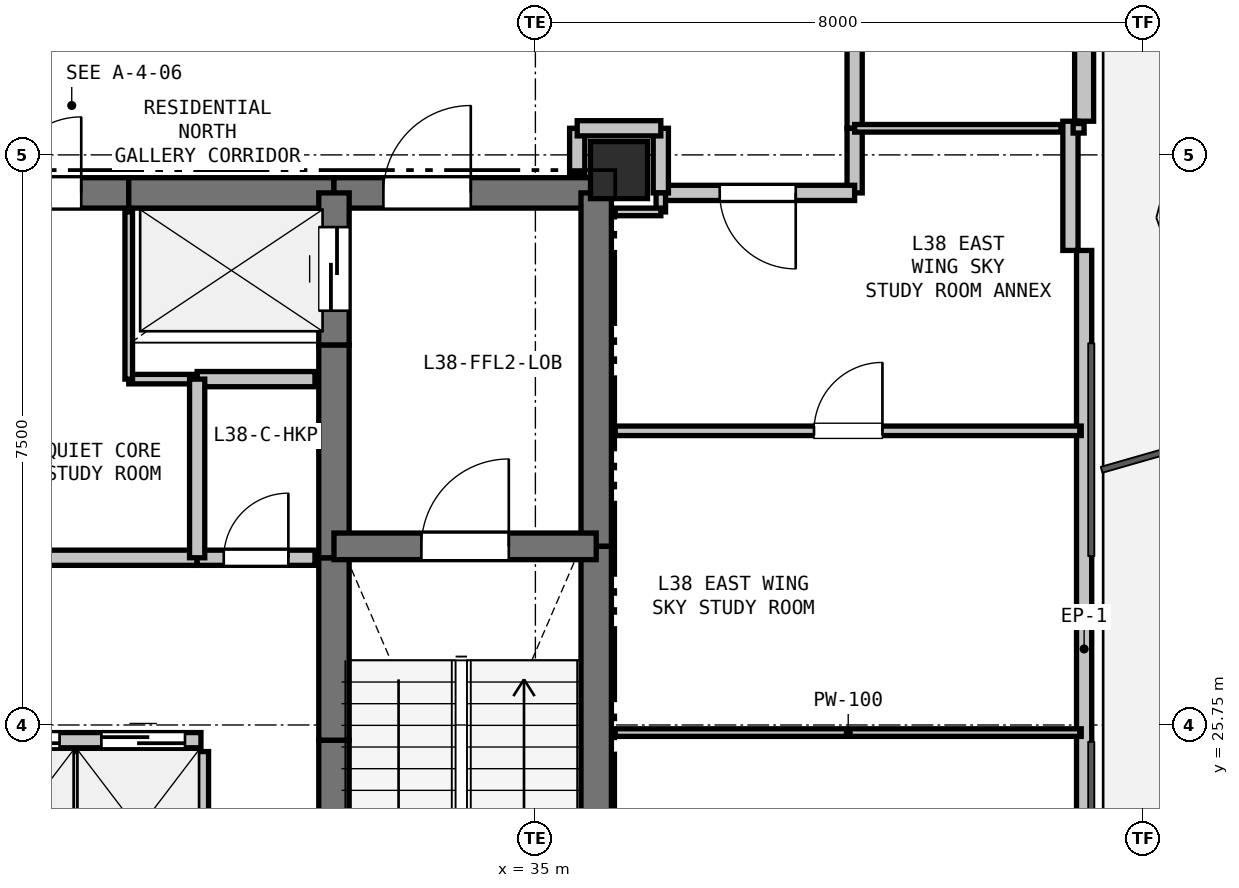
"""IFC4 building model, lengths in metres.
Left out: names, types, materials, properties, quantities, classifications, styles, units other than length and angle.
Written with IfcOpenShell. Run it as: python <this file> out.ifc"""

import sys

from ifc_helpers import new_model, si_unit, direction, frame, frame_2d, origin, origin_2d, place, context, subcontext, project, spatial, rectangle, extrude, element, fill, save


model = new_model("IFC4")
c1 = context("Model", 3, precision=1e-05, world=origin(), true_north=direction((0.0, 1.0)))
c2 = subcontext(c1, "Body", "Model", "MODEL_VIEW")
j1 = project(units=[si_unit("LENGTHUNIT", "METRE"), si_unit("PLANEANGLEUNIT", "RADIAN")], contexts=[c1])
p1 = place(None, origin())
s1 = spatial("IfcSite", under=j1, at=p1, CompositionType="ELEMENT")
p2 = place(p1, origin())
s2 = spatial("IfcBuilding", under=s1, at=p2, CompositionType="ELEMENT")
p3 = place(p2, frame((0.0, 0.0, 137.7)))
s3 = spatial("IfcBuildingStorey", under=s2, at=p3, CompositionType="ELEMENT", Elevation=137.7)
p4 = place(p3, frame((36.1, 33.05, 0.0), z_axis=(0.0, 0.0, 1.0), x_axis=(1.0, 0.0, 0.0)))
e1 = element("IfcColumn", 1, at=p4, inside=s3, PredefinedType="COLUMN", context=c2, shape_type="SweptSolid", body=[
    extrude(rectangle(XDim=0.75, YDim=0.75, at=origin_2d()), origin(), (0.0, 0.0, 1.0), 3.3),
])
p5 = place(p3, frame((42.219, 44.879, 0.0), z_axis=(0.0, 0.0, 1.0), x_axis=(0.0, -1.0, 0.0)))
e2 = element("IfcWall", 2, at=p5, inside=s3, PredefinedType="SOLIDWALL", context=c2, shape_type="SweptSolid", body=[
    extrude(rectangle(XDim=11.186, YDim=0.25, at=frame_2d((5.593, 0.0))), origin(), (0.0, 0.0, 1.0), 2.68),
])
p6 = place(p5, frame((8.109, 0.0, 0.0)))
e3 = element("IfcOpeningElement", 3, at=p6, cuts=e2, PredefinedType="OPENING", context=c2, shape_type="SweptSolid", body=[
    extrude(rectangle(XDim=1.1, YDim=2.1, at=frame_2d((0.55, 1.05))), frame((0.0, 0.135, 0.0), z_axis=(0.0, -1.0, 0.0), x_axis=(1.0, 0.0, 0.0)), (0.0, 0.0, 1.0), 0.27),
])
p7 = place(p5, frame((3.886, 0.0, 0.9)))
e4 = element("IfcOpeningElement", 4, at=p7, cuts=e2, PredefinedType="OPENING", context=c2, shape_type="SweptSolid", body=[
    extrude(rectangle(XDim=1.2, YDim=1.4, at=frame_2d((0.6, 0.7))), frame((0.0, 0.135, 0.0), z_axis=(0.0, -1.0, 0.0), x_axis=(1.0, 0.0, 0.0)), (0.0, 0.0, 1.0), 0.27),
])
p8 = place(p3, frame((42.219, 31.993, 0.0), z_axis=(0.0, 0.0, 1.0), x_axis=(0.0, -1.0, 0.0)))
e5 = element("IfcWall", 5, at=p8, inside=s3, PredefinedType="PARAPET", context=c2, shape_type="SweptSolid", body=[
    extrude(rectangle(XDim=10.486, YDim=0.2, at=frame_2d((5.243, 0.0))), origin(), (0.0, 0.0, 1.0), 0.2),
])
p9 = place(p3, frame((42.039, 33.693, 0.0), z_axis=(0.0, 0.0, 1.0), x_axis=(0.0, -1.0, 0.0)))
e6 = element("IfcWall", 6, at=p9, inside=s3, PredefinedType="PARAPET", context=c2, shape_type="SweptSolid", body=[
    extrude(rectangle(XDim=1.7, YDim=0.2, at=frame_2d((0.85, 0.0))), origin(), (0.0, 0.0, 1.0), 2.68),
])
p10 = place(p3, frame((27.4, 32.75, 0.0), z_axis=(0.0, 0.0, 1.0), x_axis=(1.0, 0.0, 0.0)))
e7 = element("IfcWall", 7, at=p10, inside=s3, PredefinedType="SHEAR", context=c2, shape_type="SweptSolid", body=[
    extrude(rectangle(XDim=2.25, YDim=0.4, at=frame_2d((1.125, 0.0))), origin(), (0.0, 0.0, 1.0), 3.06),
])
p11 = place(p10, frame((0.625, 0.0, 0.0)))
e8 = element("IfcOpeningElement", 8, at=p11, cuts=e7, PredefinedType="OPENING", context=c2, shape_type="SweptSolid", body=[
    extrude(rectangle(XDim=1.0, YDim=2.15, at=frame_2d((0.5, 1.075))), frame((0.0, 0.21, 0.0), z_axis=(0.0, -1.0, 0.0), x_axis=(1.0, 0.0, 0.0)), (0.0, 0.0, 1.0), 0.42),
])
p12 = place(p3, frame((29.65, 32.75, 0.0), z_axis=(0.0, 0.0, 1.0), x_axis=(1.0, 0.0, 0.0)))
e9 = element("IfcWall", 9, at=p12, inside=s3, PredefinedType="SHEAR", context=c2, shape_type="SweptSolid", body=[
    extrude(rectangle(XDim=2.7, YDim=0.4, at=frame_2d((1.35, 0.0))), origin(), (0.0, 0.0, 1.0), 3.06),
])
p13 = place(p3, frame((32.35, 32.75, 0.0), z_axis=(0.0, 0.0, 1.0), x_axis=(1.0, 0.0, 0.0)))
e10 = element("IfcWall", 10, at=p13, inside=s3, PredefinedType="SHEAR", context=c2, shape_type="SweptSolid", body=[
    extrude(rectangle(XDim=3.45, YDim=0.4, at=frame_2d((1.725, 0.0))), origin(), (0.0, 0.0, 1.0), 3.06),
])
p14 = place(p13, frame((0.65, 0.0, 0.0)))
e11 = element("IfcOpeningElement", 11, at=p14, cuts=e10, PredefinedType="OPENING", context=c2, shape_type="SweptSolid", body=[
    extrude(rectangle(XDim=1.15, YDim=2.15, at=frame_2d((0.575, 1.075))), frame((0.0, 0.21, 0.0), z_axis=(0.0, -1.0, 0.0), x_axis=(1.0, 0.0, 0.0)), (0.0, 0.0, 1.0), 0.42),
])
p15 = place(p3, frame((35.8, 32.75, 0.0), z_axis=(0.0, 0.0, 1.0), x_axis=(0.0, -1.0, 0.0)))
e12 = element("IfcWall", 12, at=p15, inside=s3, PredefinedType="SHEAR", context=c2, shape_type="SweptSolid", body=[
    extrude(rectangle(XDim=4.65, YDim=0.4, at=frame_2d((2.325, 0.0))), origin(), (0.0, 0.0, 1.0), 3.06),
])
p16 = place(p3, frame((35.8, 28.1, 0.0), z_axis=(0.0, 0.0, 1.0), x_axis=(0.0, -1.0, 0.0)))
e13 = element("IfcWall", 13, at=p16, inside=s3, PredefinedType="SHEAR", context=c2, shape_type="SweptSolid", body=[
    extrude(rectangle(XDim=7.35, YDim=0.4, at=frame_2d((3.675, 0.0))), origin(), (0.0, 0.0, 1.0), 3.06),
])
p17 = place(p3, frame((32.35, 20.75, 0.0), z_axis=(0.0, 0.0, 1.0), x_axis=(0.0, 1.0, 0.0)))
e14 = element("IfcWall", 14, at=p17, inside=s3, PredefinedType="SHEAR", context=c2, shape_type="SweptSolid", body=[
    extrude(rectangle(XDim=4.8, YDim=0.4, at=frame_2d((2.4, 0.0))), origin(), (0.0, 0.0, 1.0), 3.06),
])
p18 = place(p3, frame((32.35, 25.55, 0.0), z_axis=(0.0, 0.0, 1.0), x_axis=(0.0, 1.0, 0.0)))
e15 = element("IfcWall", 15, at=p18, inside=s3, PredefinedType="SHEAR", context=c2, shape_type="SweptSolid", body=[
    extrude(rectangle(XDim=2.4, YDim=0.4, at=frame_2d((1.2, 0.0))), origin(), (0.0, 0.0, 1.0), 3.06),
])
p19 = place(p3, frame((32.35, 27.95, 0.0), z_axis=(0.0, 0.0, 1.0), x_axis=(0.0, 1.0, 0.0)))
e16 = element("IfcWall", 16, at=p19, inside=s3, PredefinedType="SHEAR", context=c2, shape_type="SweptSolid", body=[
    extrude(rectangle(XDim=2.8, YDim=0.4, at=frame_2d((1.4, 0.0))), origin(), (0.0, 0.0, 1.0), 3.06),
])
p20 = place(p3, frame((32.35, 30.75, 0.0), z_axis=(0.0, 0.0, 1.0), x_axis=(0.0, 1.0, 0.0)))
e17 = element("IfcWall", 17, at=p20, inside=s3, PredefinedType="SHEAR", context=c2, shape_type="SweptSolid", body=[
    extrude(rectangle(XDim=2.0, YDim=0.4, at=frame_2d((1.0, 0.0))), origin(), (0.0, 0.0, 1.0), 3.06),
])
p21 = place(p20, frame((0.45, 0.0, 0.0)))
e18 = element("IfcOpeningElement", 18, at=p21, cuts=e17, PredefinedType="OPENING", context=c2, shape_type="SweptSolid", body=[
    extrude(rectangle(XDim=1.1, YDim=2.15, at=frame_2d((0.55, 1.075))), frame((0.0, 0.21, 0.0), z_axis=(0.0, -1.0, 0.0), x_axis=(1.0, 0.0, 0.0)), (0.0, 0.0, 1.0), 0.42),
])
p22 = place(p3, frame((32.35, 28.1, 0.0), z_axis=(0.0, 0.0, 1.0), x_axis=(1.0, 0.0, 0.0)))
e19 = element("IfcWall", 19, at=p22, inside=s3, PredefinedType="SHEAR", context=c2, shape_type="SweptSolid", body=[
    extrude(rectangle(XDim=3.45, YDim=0.35, at=frame_2d((1.725, 0.0))), origin(), (0.0, 0.0, 1.0), 3.06),
])
p23 = place(p22, frame((1.15, 0.0, 0.0)))
e20 = element("IfcOpeningElement", 20, at=p23, cuts=e19, PredefinedType="OPENING", context=c2, shape_type="SweptSolid", body=[
    extrude(rectangle(XDim=1.15, YDim=2.15, at=frame_2d((0.575, 1.075))), frame((0.0, 0.185, 0.0), z_axis=(0.0, -1.0, 0.0), x_axis=(1.0, 0.0, 0.0)), (0.0, 0.0, 1.0), 0.37),
])
p24 = place(p3, frame((25.65, 25.55, 0.0), z_axis=(0.0, 0.0, 1.0), x_axis=(1.0, 0.0, 0.0)))
e21 = element("IfcWall", 21, at=p24, inside=s3, PredefinedType="PARTITIONING", context=c2, shape_type="SweptSolid", body=[
    extrude(rectangle(XDim=4.95, YDim=0.2, at=frame_2d((2.475, 0.0))), origin(), (0.0, 0.0, 1.0), 3.06),
])
p25 = place(p24, frame((0.34, 0.0, 0.0)))
e22 = element("IfcOpeningElement", 22, at=p25, cuts=e21, PredefinedType="OPENING", context=c2, shape_type="SweptSolid", body=[
    extrude(rectangle(XDim=1.1, YDim=2.15, at=frame_2d((0.55, 1.075))), frame((0.0, 0.11, 0.0), z_axis=(0.0, -1.0, 0.0), x_axis=(1.0, 0.0, 0.0)), (0.0, 0.0, 1.0), 0.22),
])
p26 = place(p24, frame((1.99, 0.0, 0.0)))
e23 = element("IfcOpeningElement", 23, at=p26, cuts=e21, PredefinedType="OPENING", context=c2, shape_type="SweptSolid", body=[
    extrude(rectangle(XDim=1.1, YDim=2.15, at=frame_2d((0.55, 1.075))), frame((0.0, 0.11, 0.0), z_axis=(0.0, -1.0, 0.0), x_axis=(1.0, 0.0, 0.0)), (0.0, 0.0, 1.0), 0.22),
])
p27 = place(p24, frame((3.64, 0.0, 0.0)))
e24 = element("IfcOpeningElement", 24, at=p27, cuts=e21, PredefinedType="OPENING", context=c2, shape_type="SweptSolid", body=[
    extrude(rectangle(XDim=1.1, YDim=2.15, at=frame_2d((0.55, 1.075))), frame((0.0, 0.11, 0.0), z_axis=(0.0, -1.0, 0.0), x_axis=(1.0, 0.0, 0.0)), (0.0, 0.0, 1.0), 0.22),
])
p28 = place(p3, frame((32.1, 30.3, 0.0), z_axis=(0.0, 0.0, 1.0), x_axis=(-1.0, 0.0, 0.0)))
e25 = element("IfcWall", 25, at=p28, inside=s3, PredefinedType="PARTITIONING", context=c2, shape_type="SweptSolid", body=[
    extrude(rectangle(XDim=1.55, YDim=0.2, at=frame_2d((0.775, 0.0))), origin(), (0.0, 0.0, 1.0), 3.06),
])
p29 = place(p3, frame((30.55, 30.3, 0.0), z_axis=(0.0, 0.0, 1.0), x_axis=(-1.0, 0.0, 0.0)))
e26 = element("IfcWall", 26, at=p29, inside=s3, PredefinedType="PARTITIONING", context=c2, shape_type="SweptSolid", body=[
    extrude(rectangle(XDim=0.9, YDim=0.125, at=frame_2d((0.45, 0.0))), origin(), (0.0, 0.0, 1.0), 3.06),
])
for number, where, z_axis, x_axis in (
    (27, (29.65, 30.3, 0.0), (0.0, 0.0, 1.0), (0.0, 1.0, 0.0)),
    (28, (28.95, 25.4, 0.0), (0.0, 0.0, 1.0), (0.0, -1.0, 0.0)),
):
    element("IfcWall", number, at=place(p3, frame(where, z_axis=z_axis, x_axis=x_axis)), inside=s3, PredefinedType="PARTITIONING", context=c2, shape_type="SweptSolid", body=[
        extrude(rectangle(XDim=2.2, YDim=0.1, at=frame_2d((1.1, 0.0))), origin(), (0.0, 0.0, 1.0), 3.06),
    ])
p30 = place(p3, frame((30.6, 25.4, 0.0), z_axis=(0.0, 0.0, 1.0), x_axis=(0.0, -1.0, 0.0)))
e29 = element("IfcWall", 29, at=p30, inside=s3, PredefinedType="PARTITIONING", context=c2, shape_type="SweptSolid", body=[
    extrude(rectangle(XDim=2.2, YDim=0.2, at=frame_2d((1.1, 0.0))), origin(), (0.0, 0.0, 1.0), 3.06),
])
p31 = place(p3, frame((27.4, 27.95, 0.0), z_axis=(0.0, 0.0, 1.0), x_axis=(1.0, 0.0, 0.0)))
e30 = element("IfcWall", 30, at=p31, inside=s3, PredefinedType="PARTITIONING", context=c2, shape_type="SweptSolid", body=[
    extrude(rectangle(XDim=3.15, YDim=0.2, at=frame_2d((1.575, 0.0))), origin(), (0.0, 0.0, 1.0), 3.06),
])
p32 = place(p3, frame((30.55, 27.95, 0.0), z_axis=(0.0, 0.0, 1.0), x_axis=(1.0, 0.0, 0.0)))
e31 = element("IfcWall", 31, at=p32, inside=s3, PredefinedType="PARTITIONING", context=c2, shape_type="SweptSolid", body=[
    extrude(rectangle(XDim=1.55, YDim=0.2, at=frame_2d((0.775, 0.0))), origin(), (0.0, 0.0, 1.0), 3.06),
])
p33 = place(p32, frame((0.35, 0.0, 0.0)))
e32 = element("IfcOpeningElement", 32, at=p33, cuts=e31, PredefinedType="OPENING", context=c2, shape_type="SweptSolid", body=[
    extrude(rectangle(XDim=0.85, YDim=2.1, at=frame_2d((0.425, 1.05))), frame((0.0, 0.11, 0.0), z_axis=(0.0, -1.0, 0.0), x_axis=(1.0, 0.0, 0.0)), (0.0, 0.0, 1.0), 0.22),
])
p34 = place(p3, frame((35.55, 33.6, 0.0), z_axis=(0.0, 0.0, 1.0), x_axis=(0.0, -1.0, 0.0)))
e33 = element("IfcWall", 33, at=p34, inside=s3, PredefinedType="PARTITIONING", context=c2, shape_type="SweptSolid", body=[
    extrude(rectangle(XDim=0.6, YDim=0.2, at=frame_2d((0.3, 0.0))), origin(), (0.0, 0.0, 1.0), 2.508),
])
p35 = place(p3, frame((39.2, 35.35, 0.0), z_axis=(0.0, 0.0, 1.0), x_axis=(0.0, -1.0, 0.0)))
e34 = element("IfcWall", 34, at=p35, inside=s3, PredefinedType="PARTITIONING", context=c2, shape_type="SweptSolid", body=[
    extrude(rectangle(XDim=1.75, YDim=0.2, at=frame_2d((0.875, 0.0))), origin(), (0.0, 0.0, 1.0), 3.06),
])
p36 = place(p3, frame((39.2, 33.6, 0.0), z_axis=(0.0, 0.0, 1.0), x_axis=(0.0, -1.0, 0.0)))
e35 = element("IfcWall", 35, at=p36, inside=s3, PredefinedType="PARTITIONING", context=c2, shape_type="SweptSolid", body=[
    extrude(rectangle(XDim=0.85, YDim=0.2, at=frame_2d((0.425, 0.0))), origin(), (0.0, 0.0, 1.0), 3.06),
])
p37 = place(p3, frame((39.2, 32.75, 0.0), z_axis=(0.0, 0.0, 1.0), x_axis=(-1.0, 0.0, 0.0)))
e36 = element("IfcWall", 36, at=p37, inside=s3, PredefinedType="PARTITIONING", context=c2, shape_type="SweptSolid", body=[
    extrude(rectangle(XDim=2.55, YDim=0.2, at=frame_2d((1.275, 0.0))), origin(), (0.0, 0.0, 1.0), 3.06),
])
p38 = place(p37, frame((0.775, 0.0, 0.0)))
e37 = element("IfcOpeningElement", 37, at=p38, cuts=e36, PredefinedType="OPENING", context=c2, shape_type="SweptSolid", body=[
    extrude(rectangle(XDim=1.0, YDim=2.15, at=frame_2d((0.5, 1.075))), frame((0.0, 0.11, 0.0), z_axis=(0.0, -1.0, 0.0), x_axis=(1.0, 0.0, 0.0)), (0.0, 0.0, 1.0), 0.22),
])
p39 = place(p3, frame((36.65, 32.75, 0.0), z_axis=(0.0, 0.0, 1.0), x_axis=(0.0, 1.0, 0.0)))
e38 = element("IfcWall", 38, at=p39, inside=s3, PredefinedType="PARTITIONING", context=c2, shape_type="SweptSolid", body=[
    extrude(rectangle(XDim=0.85, YDim=0.2, at=frame_2d((0.425, 0.0))), origin(), (0.0, 0.0, 1.0), 2.433),
])
p40 = place(p3, frame((36.65, 33.6, 0.0), z_axis=(0.0, 0.0, 1.0), x_axis=(-1.0, 0.0, 0.0)))
e39 = element("IfcWall", 39, at=p40, inside=s3, PredefinedType="PARTITIONING", context=c2, shape_type="SweptSolid", body=[
    extrude(rectangle(XDim=1.1, YDim=0.2, at=frame_2d((0.55, 0.0))), origin(), (0.0, 0.0, 1.0), 2.433),
])
p41 = place(p3, frame((30.55, 30.3, 0.0), z_axis=(0.0, 0.0, 1.0), x_axis=(0.0, -1.0, 0.0)))
e40 = element("IfcWall", 40, at=p41, inside=s3, PredefinedType="PARTITIONING", context=c2, shape_type="SweptSolid", body=[
    extrude(rectangle(XDim=2.35, YDim=0.2, at=frame_2d((1.175, 0.0))), origin(), (0.0, 0.0, 1.0), 3.06),
])
p42 = place(p3, frame((36.05, 29.62, 0.0), z_axis=(0.0, 0.0, 1.0), x_axis=(1.0, 0.0, 0.0)))
e41 = element("IfcWall", 41, at=p42, inside=s3, PredefinedType="PARTITIONING", context=c2, shape_type="SweptSolid", body=[
    extrude(rectangle(XDim=6.131, YDim=0.125, at=frame_2d((3.065, 0.0))), origin(), (0.0, 0.0, 1.0), 2.365),
])
p43 = place(p42, frame((2.615, 0.0, 0.0)))
e42 = element("IfcOpeningElement", 42, at=p43, cuts=e41, PredefinedType="OPENING", context=c2, shape_type="SweptSolid", body=[
    extrude(rectangle(XDim=0.9, YDim=2.1, at=frame_2d((0.45, 1.05))), frame((0.0, 0.073, 0.0), z_axis=(0.0, -1.0, 0.0), x_axis=(1.0, 0.0, 0.0)), (0.0, 0.0, 1.0), 0.145),
])
p44 = place(p3, frame((42.181, 25.65, 0.0), z_axis=(0.0, 0.0, 1.0), x_axis=(-1.0, 0.0, 0.0)))
e43 = element("IfcWall", 43, at=p44, inside=s3, PredefinedType="PARTITIONING", context=c2, shape_type="SweptSolid", body=[
    extrude(rectangle(XDim=6.131, YDim=0.1, at=frame_2d((3.065, 0.0))), origin(), (0.0, 0.0, 1.0), 2.365),
])
p45 = place(p3, frame((36.65, 32.5, 0.0), z_axis=(0.0, 0.0, 1.0), x_axis=(0.0, 1.0, 0.0)))
e44 = element("IfcWall", 44, at=p45, inside=s3, PredefinedType="PARTITIONING", context=c2, shape_type="SweptSolid", body=[
    extrude(rectangle(XDim=0.25, YDim=0.125, at=frame_2d((0.125, 0.0))), origin(), (0.0, 0.0, 1.0), 3.06),
])
p46 = place(p3, frame((39.2, 33.6, 0.0), z_axis=(0.0, 0.0, 1.0), x_axis=(1.0, 0.0, 0.0)))
e45 = element("IfcWall", 45, at=p46, inside=s3, PredefinedType="PARTITIONING", context=c2, shape_type="SweptSolid", body=[
    extrude(rectangle(XDim=2.715, YDim=0.1, at=frame_2d((1.358, 0.0))), origin(), (0.0, 0.0, 1.0), 2.365),
])
p47 = place(p3, frame((42.074, 33.6, 0.0), z_axis=(0.0, 0.0, 1.0), x_axis=(1.0, 0.0, 0.0)))
e46 = element("IfcWall", 46, at=p47, inside=s3, PredefinedType="PARTITIONING", context=c2, shape_type="SweptSolid", body=[
    extrude(rectangle(XDim=0.145, YDim=0.125, at=frame_2d((0.072, 0.0))), origin(), (0.0, 0.0, 1.0), 3.06),
])
p48 = place(p3, frame((36.05, 32.5, 0.0), z_axis=(0.0, 0.0, 1.0), x_axis=(1.0, 0.0, 0.0)))
e47 = element("IfcWall", 47, at=p48, inside=s3, PredefinedType="PARTITIONING", context=c2, shape_type="SweptSolid", body=[
    extrude(rectangle(XDim=0.6, YDim=0.1, at=frame_2d((0.3, 0.0))), origin(), (0.0, 0.0, 1.0), 2.508),
])
p49 = place(p26, origin())
e48 = element("IfcDoor", 48, at=p49, inside=s3, OperationType="SLIDING_TO_LEFT", PredefinedType="DOOR", context=c2, shape_type="SweptSolid", body=[
    extrude(rectangle(XDim=1.1, YDim=2.15, at=frame_2d((0.55, 1.075))), frame((0.0, 0.025, 0.0), z_axis=(0.0, -1.0, 0.0), x_axis=(1.0, 0.0, 0.0)), (0.0, 0.0, 1.0), 0.05),
])
fill(e23, e48)
p50 = place(p27, origin())
e49 = element("IfcDoor", 49, at=p50, inside=s3, OperationType="SLIDING_TO_LEFT", PredefinedType="DOOR", context=c2, shape_type="SweptSolid", body=[
    extrude(rectangle(XDim=1.1, YDim=2.15, at=frame_2d((0.55, 1.075))), frame((0.0, 0.025, 0.0), z_axis=(0.0, -1.0, 0.0), x_axis=(1.0, 0.0, 0.0)), (0.0, 0.0, 1.0), 0.05),
])
fill(e24, e49)
p51 = place(p21, origin())
e50 = element("IfcDoor", 50, at=p51, inside=s3, OperationType="SLIDING_TO_LEFT", PredefinedType="DOOR", context=c2, shape_type="SweptSolid", body=[
    extrude(rectangle(XDim=1.1, YDim=2.15, at=frame_2d((0.55, 1.075))), frame((0.0, 0.025, 0.0), z_axis=(0.0, -1.0, 0.0), x_axis=(1.0, 0.0, 0.0)), (0.0, 0.0, 1.0), 0.05),
])
fill(e18, e50)
p52 = place(p23, origin())
e51 = element("IfcDoor", 51, at=p52, inside=s3, OperationType="SINGLE_SWING_RIGHT", PredefinedType="DOOR", context=c2, shape_type="SweptSolid", body=[
    extrude(rectangle(XDim=1.15, YDim=2.15, at=frame_2d((0.575, 1.075))), frame((0.0, 0.025, 0.0), z_axis=(0.0, -1.0, 0.0), x_axis=(1.0, 0.0, 0.0)), (0.0, 0.0, 1.0), 0.05),
])
fill(e20, e51)
p53 = place(p14, origin())
e52 = element("IfcDoor", 52, at=p53, inside=s3, OperationType="SINGLE_SWING_RIGHT", PredefinedType="DOOR", context=c2, shape_type="SweptSolid", body=[
    extrude(rectangle(XDim=1.15, YDim=2.15, at=frame_2d((0.575, 1.075))), frame((0.0, 0.025, 0.0), z_axis=(0.0, -1.0, 0.0), x_axis=(1.0, 0.0, 0.0)), (0.0, 0.0, 1.0), 0.05),
])
fill(e11, e52)
p54 = place(p33, origin())
e53 = element("IfcDoor", 53, at=p54, inside=s3, OperationType="SINGLE_SWING_RIGHT", PredefinedType="DOOR", context=c2, shape_type="SweptSolid", body=[
    extrude(rectangle(XDim=0.85, YDim=2.1, at=frame_2d((0.425, 1.05))), frame((0.0, 0.025, 0.0), z_axis=(0.0, -1.0, 0.0), x_axis=(1.0, 0.0, 0.0)), (0.0, 0.0, 1.0), 0.05),
])
fill(e32, e53)
p55 = place(p11, origin())
e54 = element("IfcDoor", 54, at=p55, inside=s3, OperationType="SINGLE_SWING_RIGHT", PredefinedType="DOOR", context=c2, shape_type="SweptSolid", body=[
    extrude(rectangle(XDim=1.0, YDim=2.15, at=frame_2d((0.5, 1.075))), frame((0.0, 0.025, 0.0), z_axis=(0.0, -1.0, 0.0), x_axis=(1.0, 0.0, 0.0)), (0.0, 0.0, 1.0), 0.05),
])
fill(e8, e54)
p56 = place(p38, origin())
e55 = element("IfcDoor", 55, at=p56, inside=s3, OperationType="SINGLE_SWING_LEFT", PredefinedType="DOOR", context=c2, shape_type="SweptSolid", body=[
    extrude(rectangle(XDim=1.0, YDim=2.15, at=frame_2d((0.5, 1.075))), frame((0.0, 0.025, 0.0), z_axis=(0.0, -1.0, 0.0), x_axis=(1.0, 0.0, 0.0)), (0.0, 0.0, 1.0), 0.05),
])
fill(e37, e55)
p57 = place(p43, origin())
e56 = element("IfcDoor", 56, at=p57, inside=s3, OperationType="SINGLE_SWING_RIGHT", PredefinedType="DOOR", context=c2, shape_type="SweptSolid", body=[
    extrude(rectangle(XDim=0.9, YDim=2.1, at=frame_2d((0.45, 1.05))), frame((0.0, 0.025, 0.0), z_axis=(0.0, -1.0, 0.0), x_axis=(1.0, 0.0, 0.0)), (0.0, 0.0, 1.0), 0.05),
])
fill(e42, e56)
save(model, sys.argv[1])
